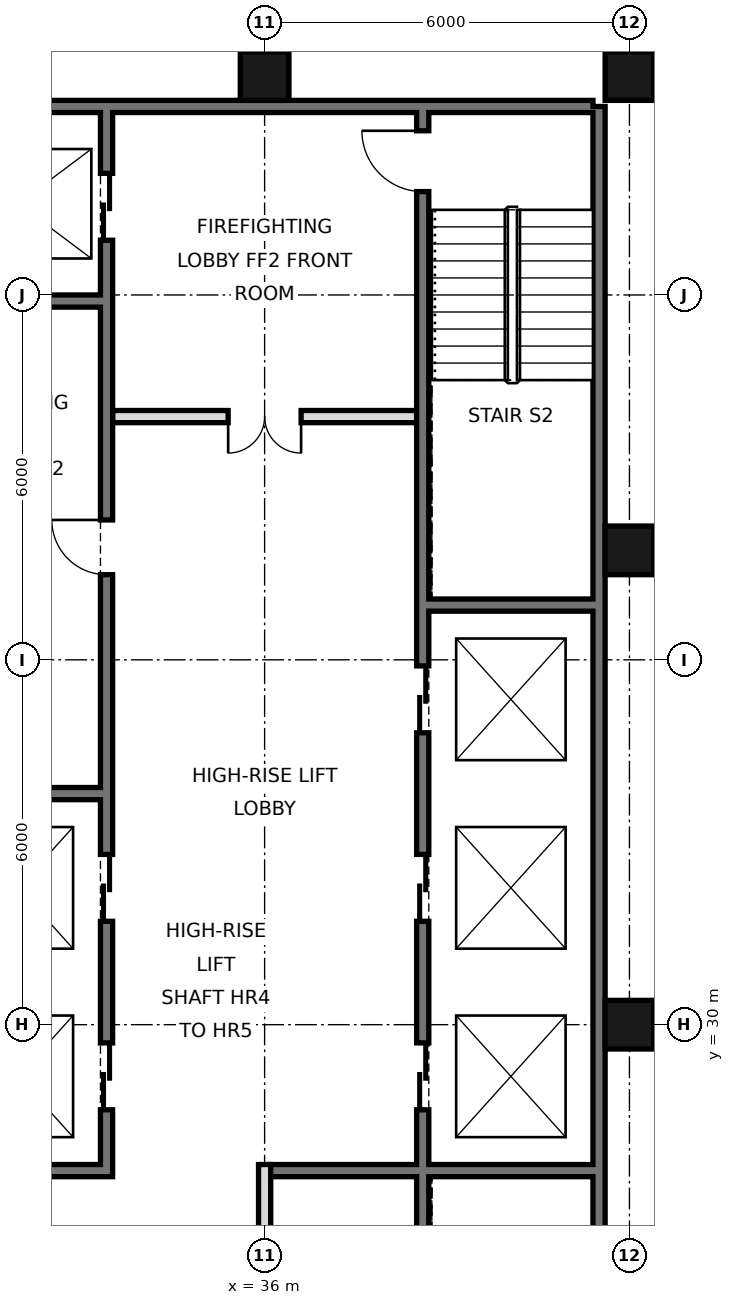
"""IFC4 building model, lengths in metres.
Left out: names, types, materials, properties, quantities, classifications, styles, units other than length and angle.
Written with IfcOpenShell. Run it as: python <this file> out.ifc"""

import sys

from ifc_helpers import new_model, si_unit, direction, frame, frame_2d, origin, origin_2d, place, context, subcontext, project, spatial, rectangle, hollow_rectangle, extrude, element, fill, save


model = new_model("IFC4")
c1 = context("Model", 3, precision=1e-05, world=origin(), true_north=direction((0.0, 1.0)))
c2 = subcontext(c1, "Body", "Model", "MODEL_VIEW")
j1 = project(units=[si_unit("LENGTHUNIT", "METRE"), si_unit("PLANEANGLEUNIT", "RADIAN")], contexts=[c1])
p1 = place(None, origin())
s1 = spatial("IfcSite", under=j1, at=p1, CompositionType="ELEMENT")
p2 = place(p1, origin())
s2 = spatial("IfcBuilding", under=s1, at=p2, CompositionType="ELEMENT")
p3 = place(p2, frame((0.0, 0.0, 301.6)))
s3 = spatial("IfcBuildingStorey", under=s2, at=p3, CompositionType="ELEMENT", Elevation=301.6)
for number, where, z_axis, x_axis in (
    (1, (36.0, 45.6, 0.0), (0.0, 0.0, 1.0), (1.0, 0.0, 0.0)),
    (2, (42.0, 30.0, 0.0), (0.0, 0.0, 1.0), (1.0, 0.0, 0.0)),
    (3, (42.0, 37.8, 0.0), (0.0, 0.0, 1.0), (1.0, 0.0, 0.0)),
    (4, (42.0, 45.6, 0.0), (0.0, 0.0, 1.0), (1.0, 0.0, 0.0)),
):
    element("IfcColumn", number, at=place(p3, frame(where, z_axis=z_axis, x_axis=x_axis)), inside=s3, PredefinedType="COLUMN", context=c2, shape_type="SweptSolid", body=[
        extrude(hollow_rectangle(XDim=0.8, YDim=0.8, WallThickness=0.025, at=origin_2d()), origin(), (0.0, 0.0, 1.0), 3.6),
    ])
p4 = place(p3, frame((41.5, 21.6, 0.0), z_axis=(0.0, 0.0, 1.0), x_axis=(0.0, 1.0, 0.0)))
e5 = element("IfcWall", 5, at=p4, inside=s3, PredefinedType="SOLIDWALL", context=c2, shape_type="SweptSolid", body=[
    extrude(rectangle(XDim=23.5, YDim=0.2, at=frame_2d((11.75, 0.0))), origin(), (0.0, 0.0, 1.0), 3.42),
])
p5 = place(p3, frame((6.6, 45.1, 0.0), z_axis=(0.0, 0.0, 1.0), x_axis=(1.0, 0.0, 0.0)))
e6 = element("IfcWall", 6, at=p5, inside=s3, PredefinedType="SOLIDWALL", context=c2, shape_type="SweptSolid", body=[
    extrude(rectangle(XDim=34.8, YDim=0.2, at=frame_2d((17.4, 0.0))), origin(), (0.0, 0.0, 1.0), 3.42),
])
p6 = place(p3, frame((33.4, 27.5, 0.0), z_axis=(0.0, 0.0, 1.0), x_axis=(0.0, 1.0, 0.0)))
e7 = element("IfcWall", 7, at=p6, inside=s3, PredefinedType="SOLIDWALL", context=c2, shape_type="SweptSolid", body=[
    extrude(rectangle(XDim=17.5, YDim=0.2, at=frame_2d((8.75, 0.0))), origin(), (0.0, 0.0, 1.0), 3.42),
])
p7 = place(p6, frame((1.1, 0.0, 0.0)))
e8 = element("IfcOpeningElement", 8, at=p7, cuts=e7, PredefinedType="OPENING", context=c2, shape_type="SweptSolid", body=[
    extrude(rectangle(XDim=1.1, YDim=2.1, at=frame_2d((0.55, 1.05))), frame((0.0, 0.11, 0.0), z_axis=(0.0, -1.0, 0.0), x_axis=(1.0, 0.0, 0.0)), (0.0, 0.0, 1.0), 0.22),
])
p8 = place(p6, frame((4.2, 0.0, 0.0)))
e9 = element("IfcOpeningElement", 9, at=p8, cuts=e7, PredefinedType="OPENING", context=c2, shape_type="SweptSolid", body=[
    extrude(rectangle(XDim=1.1, YDim=2.1, at=frame_2d((0.55, 1.05))), frame((0.0, 0.11, 0.0), z_axis=(0.0, -1.0, 0.0), x_axis=(1.0, 0.0, 0.0)), (0.0, 0.0, 1.0), 0.22),
])
p9 = place(p6, frame((15.4, 0.0, 0.0)))
e10 = element("IfcOpeningElement", 10, at=p9, cuts=e7, PredefinedType="OPENING", context=c2, shape_type="SweptSolid", body=[
    extrude(rectangle(XDim=1.1, YDim=2.1, at=frame_2d((0.55, 1.05))), frame((0.0, 0.11, 0.0), z_axis=(0.0, -1.0, 0.0), x_axis=(1.0, 0.0, 0.0)), (0.0, 0.0, 1.0), 0.22),
])
p10 = place(p6, frame((9.9, 0.0, 0.0)))
e11 = element("IfcOpeningElement", 11, at=p10, cuts=e7, PredefinedType="OPENING", context=c2, shape_type="SweptSolid", body=[
    extrude(rectangle(XDim=0.9, YDim=2.1, at=frame_2d((0.45, 1.05))), frame((0.0, 0.11, 0.0), z_axis=(0.0, -1.0, 0.0), x_axis=(1.0, 0.0, 0.0)), (0.0, 0.0, 1.0), 0.22),
])
p11 = place(p3, frame((36.0, 21.6, 0.0), z_axis=(0.0, 0.0, 1.0), x_axis=(0.0, 1.0, 0.0)))
e12 = element("IfcWall", 12, at=p11, inside=s3, PredefinedType="PARTITIONING", context=c2, shape_type="SweptSolid", body=[
    extrude(rectangle(XDim=6.1, YDim=0.2, at=frame_2d((3.05, 0.0))), origin(), (0.0, 0.0, 1.0), 3.42),
])
p12 = place(p3, frame((38.6, 21.6, 0.0), z_axis=(0.0, 0.0, 1.0), x_axis=(0.0, 1.0, 0.0)))
e13 = element("IfcWall", 13, at=p12, inside=s3, PredefinedType="SOLIDWALL", context=c2, shape_type="SweptSolid", body=[
    extrude(rectangle(XDim=23.4, YDim=0.2, at=frame_2d((11.7, 0.0))), origin(), (0.0, 0.0, 1.0), 3.42),
])
p13 = place(p12, frame((7.0, 0.0, 0.0)))
e14 = element("IfcOpeningElement", 14, at=p13, cuts=e13, PredefinedType="OPENING", context=c2, shape_type="SweptSolid", body=[
    extrude(rectangle(XDim=1.1, YDim=2.1, at=frame_2d((0.55, 1.05))), frame((0.0, 0.11, 0.0), z_axis=(0.0, -1.0, 0.0), x_axis=(1.0, 0.0, 0.0)), (0.0, 0.0, 1.0), 0.22),
])
p14 = place(p12, frame((10.1, 0.0, 0.0)))
e15 = element("IfcOpeningElement", 15, at=p14, cuts=e13, PredefinedType="OPENING", context=c2, shape_type="SweptSolid", body=[
    extrude(rectangle(XDim=1.1, YDim=2.1, at=frame_2d((0.55, 1.05))), frame((0.0, 0.11, 0.0), z_axis=(0.0, -1.0, 0.0), x_axis=(1.0, 0.0, 0.0)), (0.0, 0.0, 1.0), 0.22),
])
p15 = place(p12, frame((13.2, 0.0, 0.0)))
e16 = element("IfcOpeningElement", 16, at=p15, cuts=e13, PredefinedType="OPENING", context=c2, shape_type="SweptSolid", body=[
    extrude(rectangle(XDim=1.1, YDim=2.1, at=frame_2d((0.55, 1.05))), frame((0.0, 0.11, 0.0), z_axis=(0.0, -1.0, 0.0), x_axis=(1.0, 0.0, 0.0)), (0.0, 0.0, 1.0), 0.22),
])
p16 = place(p12, frame((22.1, 0.0, 0.0)))
e17 = element("IfcOpeningElement", 17, at=p16, cuts=e13, PredefinedType="OPENING", context=c2, shape_type="SweptSolid", body=[
    extrude(rectangle(XDim=1.0, YDim=2.1, at=frame_2d((0.5, 1.05))), frame((0.0, 0.11, 0.0), z_axis=(0.0, -1.0, 0.0), x_axis=(1.0, 0.0, 0.0)), (0.0, 0.0, 1.0), 0.22),
])
p17 = place(p12, frame((0.175, 0.0, 0.0)))
e18 = element("IfcOpeningElement", 18, at=p17, cuts=e13, PredefinedType="OPENING", context=c2, shape_type="SweptSolid", body=[
    extrude(rectangle(XDim=0.9, YDim=2.1, at=frame_2d((0.45, 1.05))), frame((0.0, 0.11, 0.0), z_axis=(0.0, -1.0, 0.0), x_axis=(1.0, 0.0, 0.0)), (0.0, 0.0, 1.0), 0.22),
])
p18 = place(p3, frame((30.6, 27.6, 0.0), z_axis=(0.0, 0.0, 1.0), x_axis=(1.0, 0.0, 0.0)))
e19 = element("IfcWall", 19, at=p18, inside=s3, PredefinedType="SOLIDWALL", context=c2, shape_type="SweptSolid", body=[
    extrude(rectangle(XDim=2.7, YDim=0.2, at=frame_2d((1.35, 0.0))), origin(), (0.0, 0.0, 1.0), 3.42),
])
p19 = place(p3, frame((36.1, 27.6, 0.0), z_axis=(0.0, 0.0, 1.0), x_axis=(1.0, 0.0, 0.0)))
e20 = element("IfcWall", 20, at=p19, inside=s3, PredefinedType="SOLIDWALL", context=c2, shape_type="SweptSolid", body=[
    extrude(rectangle(XDim=5.3, YDim=0.2, at=frame_2d((2.65, 0.0))), origin(), (0.0, 0.0, 1.0), 3.42),
])
for number, where, z_axis, x_axis in (
    (21, (30.6, 33.8, 0.0), (0.0, 0.0, 1.0), (1.0, 0.0, 0.0)),
    (22, (38.7, 36.9, 0.0), (0.0, 0.0, 1.0), (1.0, 0.0, 0.0)),
):
    element("IfcWall", number, at=place(p3, frame(where, z_axis=z_axis, x_axis=x_axis)), inside=s3, PredefinedType="SOLIDWALL", context=c2, shape_type="SweptSolid", body=[
        extrude(rectangle(XDim=2.7, YDim=0.2, at=frame_2d((1.35, 0.0))), origin(), (0.0, 0.0, 1.0), 3.42),
    ])
p20 = place(p3, frame((33.5, 40.0, 0.0), z_axis=(0.0, 0.0, 1.0), x_axis=(1.0, 0.0, 0.0)))
e23 = element("IfcWall", 23, at=p20, inside=s3, PredefinedType="PARTITIONING", context=c2, shape_type="SweptSolid", body=[
    extrude(rectangle(XDim=5.0, YDim=0.2, at=frame_2d((2.5, 0.0))), origin(), (0.0, 0.0, 1.0), 3.42),
])
p21 = place(p20, frame((1.9, 0.0, 0.0)))
e24 = element("IfcOpeningElement", 24, at=p21, cuts=e23, PredefinedType="OPENING", context=c2, shape_type="SweptSolid", body=[
    extrude(rectangle(XDim=1.2, YDim=2.1, at=frame_2d((0.6, 1.05))), frame((0.0, 0.11, 0.0), z_axis=(0.0, -1.0, 0.0), x_axis=(1.0, 0.0, 0.0)), (0.0, 0.0, 1.0), 0.22),
])
p22 = place(p3, frame((30.6, 41.9, 0.0), z_axis=(0.0, 0.0, 1.0), x_axis=(1.0, 0.0, 0.0)))
e25 = element("IfcWall", 25, at=p22, inside=s3, PredefinedType="SOLIDWALL", context=c2, shape_type="SweptSolid", body=[
    extrude(rectangle(XDim=2.7, YDim=0.2, at=frame_2d((1.35, 0.0))), origin(), (0.0, 0.0, 1.0), 3.42),
])
p23 = place(p21, frame((1.2, 0.0, 0.0), z_axis=(0.0, 0.0, 1.0), x_axis=(-1.0, 0.0, 0.0)))
e26 = element("IfcDoor", 26, at=p23, inside=s3, OperationType="DOUBLE_DOOR_SINGLE_SWING", PredefinedType="DOOR", context=c2, shape_type="SweptSolid", body=[
    extrude(rectangle(XDim=1.2, YDim=2.1, at=frame_2d((0.6, 1.05))), frame((0.0, 0.025, 0.0), z_axis=(0.0, -1.0, 0.0), x_axis=(1.0, 0.0, 0.0)), (0.0, 0.0, 1.0), 0.05),
])
fill(e24, e26)
p24 = place(p13, origin())
e27 = element("IfcDoor", 27, at=p24, inside=s3, OperationType="DOUBLE_DOOR_SLIDING", PredefinedType="DOOR", context=c2, shape_type="SweptSolid", body=[
    extrude(rectangle(XDim=1.1, YDim=2.1, at=frame_2d((0.55, 1.05))), frame((0.0, 0.025, 0.0), z_axis=(0.0, -1.0, 0.0), x_axis=(1.0, 0.0, 0.0)), (0.0, 0.0, 1.0), 0.05),
])
fill(e14, e27)
p25 = place(p14, origin())
e28 = element("IfcDoor", 28, at=p25, inside=s3, OperationType="DOUBLE_DOOR_SLIDING", PredefinedType="DOOR", context=c2, shape_type="SweptSolid", body=[
    extrude(rectangle(XDim=1.1, YDim=2.1, at=frame_2d((0.55, 1.05))), frame((0.0, 0.025, 0.0), z_axis=(0.0, -1.0, 0.0), x_axis=(1.0, 0.0, 0.0)), (0.0, 0.0, 1.0), 0.05),
])
fill(e15, e28)
p26 = place(p15, origin())
e29 = element("IfcDoor", 29, at=p26, inside=s3, OperationType="DOUBLE_DOOR_SLIDING", PredefinedType="DOOR", context=c2, shape_type="SweptSolid", body=[
    extrude(rectangle(XDim=1.1, YDim=2.1, at=frame_2d((0.55, 1.05))), frame((0.0, 0.025, 0.0), z_axis=(0.0, -1.0, 0.0), x_axis=(1.0, 0.0, 0.0)), (0.0, 0.0, 1.0), 0.05),
])
fill(e16, e29)
p27 = place(p7, origin())
e30 = element("IfcDoor", 30, at=p27, inside=s3, OperationType="DOUBLE_DOOR_SLIDING", PredefinedType="DOOR", context=c2, shape_type="SweptSolid", body=[
    extrude(rectangle(XDim=1.1, YDim=2.1, at=frame_2d((0.55, 1.05))), frame((0.0, 0.025, 0.0), z_axis=(0.0, -1.0, 0.0), x_axis=(1.0, 0.0, 0.0)), (0.0, 0.0, 1.0), 0.05),
])
fill(e8, e30)
p28 = place(p8, origin())
e31 = element("IfcDoor", 31, at=p28, inside=s3, OperationType="DOUBLE_DOOR_SLIDING", PredefinedType="DOOR", context=c2, shape_type="SweptSolid", body=[
    extrude(rectangle(XDim=1.1, YDim=2.1, at=frame_2d((0.55, 1.05))), frame((0.0, 0.025, 0.0), z_axis=(0.0, -1.0, 0.0), x_axis=(1.0, 0.0, 0.0)), (0.0, 0.0, 1.0), 0.05),
])
fill(e9, e31)
p29 = place(p9, origin())
e32 = element("IfcDoor", 32, at=p29, inside=s3, OperationType="DOUBLE_DOOR_SLIDING", PredefinedType="DOOR", context=c2, shape_type="SweptSolid", body=[
    extrude(rectangle(XDim=1.1, YDim=2.1, at=frame_2d((0.55, 1.05))), frame((0.0, 0.025, 0.0), z_axis=(0.0, -1.0, 0.0), x_axis=(1.0, 0.0, 0.0)), (0.0, 0.0, 1.0), 0.05),
])
fill(e10, e32)
p30 = place(p16, frame((1.0, 0.0, 0.0), z_axis=(0.0, 0.0, 1.0), x_axis=(-1.0, 0.0, 0.0)))
e33 = element("IfcDoor", 33, at=p30, inside=s3, OperationType="SINGLE_SWING_LEFT", PredefinedType="DOOR", context=c2, shape_type="SweptSolid", body=[
    extrude(rectangle(XDim=1.0, YDim=2.1, at=frame_2d((0.5, 1.05))), frame((0.0, 0.025, 0.0), z_axis=(0.0, -1.0, 0.0), x_axis=(1.0, 0.0, 0.0)), (0.0, 0.0, 1.0), 0.05),
])
fill(e17, e33)
p31 = place(p10, frame((0.9, 0.0, 0.0), z_axis=(0.0, 0.0, 1.0), x_axis=(-1.0, 0.0, 0.0)))
e34 = element("IfcDoor", 34, at=p31, inside=s3, OperationType="SINGLE_SWING_LEFT", PredefinedType="DOOR", context=c2, shape_type="SweptSolid", body=[
    extrude(rectangle(XDim=0.9, YDim=2.1, at=frame_2d((0.45, 1.05))), frame((0.0, 0.025, 0.0), z_axis=(0.0, -1.0, 0.0), x_axis=(1.0, 0.0, 0.0)), (0.0, 0.0, 1.0), 0.05),
])
fill(e11, e34)
save(model, sys.argv[1])
